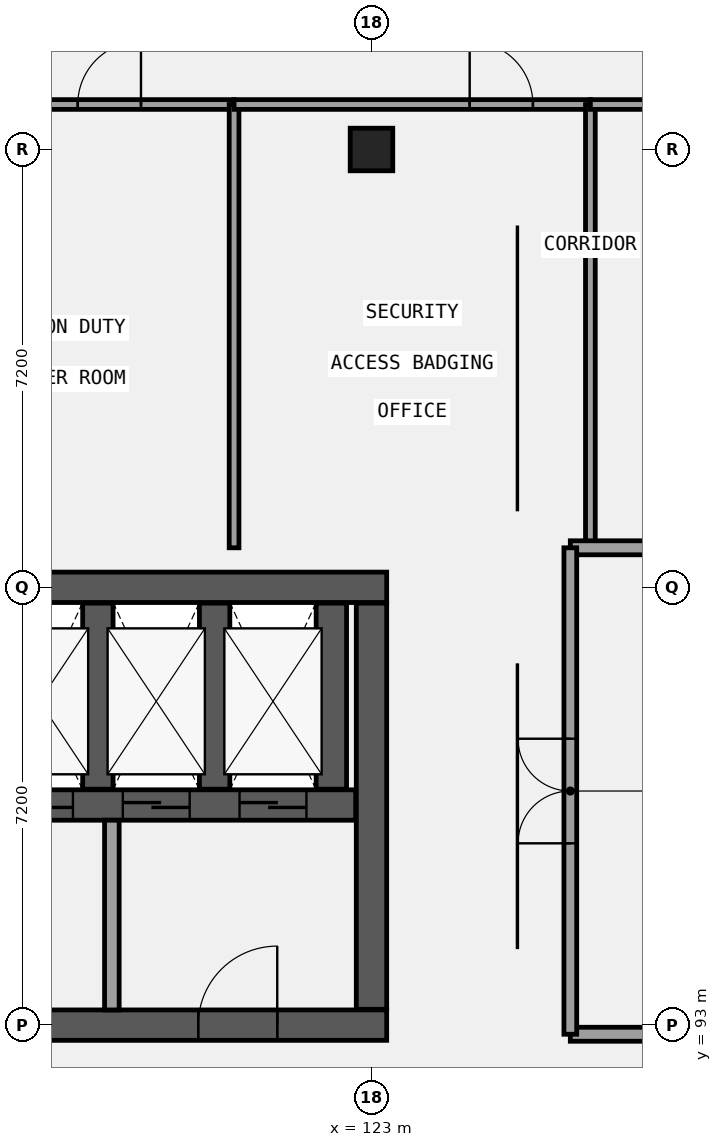
"""IFC4 building model, lengths in metres.
Left out: names, types, materials, properties, quantities, classifications, styles, units other than length and angle.
Written with IfcOpenShell. Run it as: python <this file> out.ifc"""

import sys

from ifc_helpers import new_model, si_unit, direction, frame, frame_2d, origin, origin_2d, place, context, subcontext, project, spatial, rectangle, extrude, element, fill, save


model = new_model("IFC4")
c1 = context("Model", 3, precision=1e-05, world=origin(), true_north=direction((0.0, 1.0)))
c2 = subcontext(c1, "Body", "Model", "MODEL_VIEW")
j1 = project(units=[si_unit("LENGTHUNIT", "METRE"), si_unit("PLANEANGLEUNIT", "RADIAN")], contexts=[c1])
p1 = place(None, origin())
s1 = spatial("IfcSite", under=j1, at=p1, CompositionType="ELEMENT")
p2 = place(p1, origin())
s2 = spatial("IfcBuilding", under=s1, at=p2, CompositionType="ELEMENT")
p3 = place(p2, origin())
s3 = spatial("IfcBuildingStorey", under=s2, at=p3, CompositionType="ELEMENT", Elevation=0.0)
p4 = place(p3, frame((108.35, 100.2, 0.0), z_axis=(0.0, 0.0, 1.0), x_axis=(1.0, 0.0, 0.0)))
e1 = element("IfcWall", 1, at=p4, inside=s3, PredefinedType="SHEAR", context=c2, shape_type="SweptSolid", body=[
    extrude(rectangle(XDim=14.9, YDim=0.5, at=frame_2d((7.45, 0.0))), origin(), (0.0, 0.0, 1.0), 5.4),
])
p5 = place(p3, frame((108.35, 93.0, 0.0), z_axis=(0.0, 0.0, 1.0), x_axis=(1.0, 0.0, 0.0)))
e2 = element("IfcWall", 2, at=p5, inside=s3, PredefinedType="SHEAR", context=c2, shape_type="SweptSolid", body=[
    extrude(rectangle(XDim=14.9, YDim=0.5, at=frame_2d((7.45, 0.0))), origin(), (0.0, 0.0, 1.0), 5.4),
])
p6 = place(p5, frame((3.8, 0.0, 0.0)))
e3 = element("IfcOpeningElement", 3, at=p6, cuts=e2, PredefinedType="OPENING", context=c2, shape_type="SweptSolid", body=[
    extrude(rectangle(XDim=1.3, YDim=2.2, at=frame_2d((0.65, 1.1))), frame((0.0, 0.26, 0.0), z_axis=(0.0, -1.0, 0.0), x_axis=(1.0, 0.0, 0.0)), (0.0, 0.0, 1.0), 0.52),
])
p7 = place(p5, frame((11.8, 0.0, 0.0)))
e4 = element("IfcOpeningElement", 4, at=p7, cuts=e2, PredefinedType="OPENING", context=c2, shape_type="SweptSolid", body=[
    extrude(rectangle(XDim=1.3, YDim=2.2, at=frame_2d((0.65, 1.1))), frame((0.0, 0.26, 0.0), z_axis=(0.0, -1.0, 0.0), x_axis=(1.0, 0.0, 0.0)), (0.0, 0.0, 1.0), 0.52),
])
p8 = place(p3, frame((123.0, 93.26, 0.0), z_axis=(0.0, 0.0, 1.0), x_axis=(0.0, 1.0, 0.0)))
e5 = element("IfcWall", 5, at=p8, inside=s3, PredefinedType="SHEAR", context=c2, shape_type="SweptSolid", body=[
    extrude(rectangle(XDim=6.68, YDim=0.5, at=frame_2d((3.34, 0.0))), origin(), (0.0, 0.0, 1.0), 5.4),
])
p9 = place(p3, frame((108.86, 96.62, 0.0), z_axis=(0.0, 0.0, 1.0), x_axis=(1.0, 0.0, 0.0)))
e6 = element("IfcWall", 6, at=p9, inside=s3, PredefinedType="SHEAR", context=c2, shape_type="SweptSolid", body=[
    extrude(rectangle(XDim=13.88, YDim=0.5, at=frame_2d((6.94, 0.0))), origin(), (0.0, 0.0, 1.0), 5.4),
])
p10 = place(p9, frame((8.13, 0.0, 0.0)))
e7 = element("IfcOpeningElement", 7, at=p10, cuts=e6, PredefinedType="OPENING", context=c2, shape_type="SweptSolid", body=[
    extrude(rectangle(XDim=1.1, YDim=2.15, at=frame_2d((0.55, 1.075))), frame((0.0, 0.26, 0.0), z_axis=(0.0, -1.0, 0.0), x_axis=(1.0, 0.0, 0.0)), (0.0, 0.0, 1.0), 0.52),
])
p11 = place(p9, frame((10.05, 0.0, 0.0)))
e8 = element("IfcOpeningElement", 8, at=p11, cuts=e6, PredefinedType="OPENING", context=c2, shape_type="SweptSolid", body=[
    extrude(rectangle(XDim=1.1, YDim=2.15, at=frame_2d((0.55, 1.075))), frame((0.0, 0.26, 0.0), z_axis=(0.0, -1.0, 0.0), x_axis=(1.0, 0.0, 0.0)), (0.0, 0.0, 1.0), 0.52),
])
p12 = place(p9, frame((11.97, 0.0, 0.0)))
e9 = element("IfcOpeningElement", 9, at=p12, cuts=e6, PredefinedType="OPENING", context=c2, shape_type="SweptSolid", body=[
    extrude(rectangle(XDim=1.1, YDim=2.15, at=frame_2d((0.55, 1.075))), frame((0.0, 0.26, 0.0), z_axis=(0.0, -1.0, 0.0), x_axis=(1.0, 0.0, 0.0)), (0.0, 0.0, 1.0), 0.52),
])
p13 = place(p9, frame((0.315, 0.0, 0.0)))
e10 = element("IfcOpeningElement", 10, at=p13, cuts=e6, PredefinedType="OPENING", context=c2, shape_type="SweptSolid", body=[
    extrude(rectangle(XDim=1.15, YDim=2.15, at=frame_2d((0.575, 1.075))), frame((0.0, 0.26, 0.0), z_axis=(0.0, -1.0, 0.0), x_axis=(1.0, 0.0, 0.0)), (0.0, 0.0, 1.0), 0.52),
])
for number, where, z_axis, x_axis in (
    (11, (118.5, 96.88, 0.0), (0.0, 0.0, 1.0), (0.0, 1.0, 0.0)),
    (12, (120.42, 96.88, 0.0), (0.0, 0.0, 1.0), (0.0, 1.0, 0.0)),
    (13, (122.34, 96.88, 0.0), (0.0, 0.0, 1.0), (0.0, 1.0, 0.0)),
):
    element("IfcWall", number, at=place(p3, frame(where, z_axis=z_axis, x_axis=x_axis)), inside=s3, PredefinedType="SHEAR", context=c2, shape_type="SweptSolid", body=[
        extrude(rectangle(XDim=3.06, YDim=0.5, at=frame_2d((1.53, 0.0))), origin(), (0.0, 0.0, 1.0), 5.4),
    ])
p14 = place(p3, frame((123.0, 107.4, 0.0), z_axis=(0.0, 0.0, 1.0), x_axis=(1.0, 0.0, 0.0)))
e14 = element("IfcColumn", 14, at=p14, inside=s3, PredefinedType="COLUMN", context=c2, shape_type="SweptSolid", body=[
    extrude(rectangle(XDim=0.7, YDim=0.7, at=origin_2d()), origin(), (0.0, 0.0, 1.0), 5.4),
])
p15 = place(p3, frame((118.73, 93.25, 0.0), z_axis=(0.0, 0.0, 1.0), x_axis=(0.0, 1.0, 0.0)))
e15 = element("IfcWall", 15, at=p15, inside=s3, PredefinedType="SOLIDWALL", context=c2, shape_type="SweptSolid", body=[
    extrude(rectangle(XDim=3.12, YDim=0.24, at=frame_2d((1.56, 0.0))), origin(), (0.0, 0.0, 1.0), 5.09),
])
p16 = place(p3, frame((114.88, 108.14, 0.0), z_axis=(0.0, 0.0, 1.0), x_axis=(1.0, 0.0, 0.0)))
e16 = element("IfcWall", 16, at=p16, inside=s3, PredefinedType="PARTITIONING", context=c2, shape_type="SweptSolid", body=[
    extrude(rectangle(XDim=5.86, YDim=0.16, at=frame_2d((2.93, 0.0))), origin(), (0.0, 0.0, 1.0), 5.12),
])
p17 = place(p16, frame((3.289, 0.0, 0.0)))
e17 = element("IfcOpeningElement", 17, at=p17, cuts=e16, PredefinedType="OPENING", context=c2, shape_type="SweptSolid", body=[
    extrude(rectangle(XDim=1.04, YDim=2.1, at=frame_2d((0.52, 1.05))), frame((0.0, 0.09, 0.0), z_axis=(0.0, -1.0, 0.0), x_axis=(1.0, 0.0, 0.0)), (0.0, 0.0, 1.0), 0.18),
])
p18 = place(p3, frame((120.74, 100.85, 0.0), z_axis=(0.0, 0.0, 1.0), x_axis=(0.0, 1.0, 0.0)))
e18 = element("IfcWall", 18, at=p18, inside=s3, PredefinedType="PARTITIONING", context=c2, shape_type="SweptSolid", body=[
    extrude(rectangle(XDim=7.29, YDim=0.16, at=frame_2d((3.645, 0.0))), origin(), (0.0, 0.0, 1.0), 5.12),
])
p19 = place(p3, frame((120.74, 108.14, 0.0), z_axis=(0.0, 0.0, 1.0), x_axis=(1.0, 0.0, 0.0)))
e19 = element("IfcWall", 19, at=p19, inside=s3, PredefinedType="PARTITIONING", context=c2, shape_type="SweptSolid", body=[
    extrude(rectangle(XDim=5.86, YDim=0.16, at=frame_2d((2.93, 0.0))), origin(), (0.0, 0.0, 1.0), 5.12),
])
p20 = place(p19, frame((3.875, 0.0, 0.0)))
e20 = element("IfcOpeningElement", 20, at=p20, cuts=e19, PredefinedType="OPENING", context=c2, shape_type="SweptSolid", body=[
    extrude(rectangle(XDim=1.04, YDim=2.22, at=frame_2d((0.52, 1.11))), frame((0.0, 0.09, 0.0), z_axis=(0.0, -1.0, 0.0), x_axis=(1.0, 0.0, 0.0)), (0.0, 0.0, 1.0), 0.18),
])
p21 = place(p3, frame((126.6, 100.85, 0.0), z_axis=(0.0, 0.0, 1.0), x_axis=(0.0, 1.0, 0.0)))
e21 = element("IfcWall", 21, at=p21, inside=s3, PredefinedType="PARTITIONING", context=c2, shape_type="SweptSolid", body=[
    extrude(rectangle(XDim=7.29, YDim=0.16, at=frame_2d((3.645, 0.0))), origin(), (0.0, 0.0, 1.0), 5.12),
])
p22 = place(p3, frame((126.6, 108.14, 0.0), z_axis=(0.0, 0.0, 1.0), x_axis=(1.0, 0.0, 0.0)))
e22 = element("IfcWall", 22, at=p22, inside=s3, PredefinedType="PARTITIONING", context=c2, shape_type="SweptSolid", body=[
    extrude(rectangle(XDim=5.86, YDim=0.16, at=frame_2d((2.93, 0.0))), origin(), (0.0, 0.0, 1.0), 5.12),
])
p23 = place(p22, frame((0.945, 0.0, 0.0)))
e23 = element("IfcOpeningElement", 23, at=p23, cuts=e22, PredefinedType="OPENING", context=c2, shape_type="SweptSolid", body=[
    extrude(rectangle(XDim=1.04, YDim=2.35, at=frame_2d((0.52, 1.175))), frame((0.0, 0.09, 0.0), z_axis=(0.0, -1.0, 0.0), x_axis=(1.0, 0.0, 0.0)), (0.0, 0.0, 1.0), 0.18),
])
p24 = place(p3, frame((126.27, 92.85, 0.0), z_axis=(0.0, 0.0, 1.0), x_axis=(1.0, 0.0, 0.0)))
e24 = element("IfcWall", 24, at=p24, inside=s3, PredefinedType="PARTITIONING", context=c2, shape_type="SweptSolid", body=[
    extrude(rectangle(XDim=3.28, YDim=0.23, at=frame_2d((1.64, 0.0))), origin(), (0.0, 0.0, 1.0), 4.32),
])
p25 = place(p3, frame((126.27, 100.85, 0.0), z_axis=(0.0, 0.0, 1.0), x_axis=(1.0, 0.0, 0.0)))
e25 = element("IfcWall", 25, at=p25, inside=s3, PredefinedType="PARTITIONING", context=c2, shape_type="SweptSolid", body=[
    extrude(rectangle(XDim=3.28, YDim=0.23, at=frame_2d((1.64, 0.0))), origin(), (0.0, 0.0, 1.0), 5.12),
])
p26 = place(p3, frame((126.27, 92.85, 0.0), z_axis=(0.0, 0.0, 1.0), x_axis=(0.0, 1.0, 0.0)))
e26 = element("IfcWall", 26, at=p26, inside=s3, PredefinedType="PARTITIONING", context=c2, shape_type="SweptSolid", body=[
    extrude(rectangle(XDim=8.0, YDim=0.21, at=frame_2d((4.0, 0.0))), origin(), (0.0, 0.0, 1.0), 5.12),
])
p27 = place(p26, frame((3.14, 0.0, 0.0)))
e27 = element("IfcOpeningElement", 27, at=p27, cuts=e26, PredefinedType="OPENING", context=c2, shape_type="SweptSolid", body=[
    extrude(rectangle(XDim=1.72, YDim=2.22, at=frame_2d((0.86, 1.11))), frame((0.0, 0.115, 0.0), z_axis=(0.0, -1.0, 0.0), x_axis=(1.0, 0.0, 0.0)), (0.0, 0.0, 1.0), 0.23),
])
p28 = place(p10, frame((1.1, 0.0, 0.0), z_axis=(0.0, 0.0, 1.0), x_axis=(-1.0, 0.0, 0.0)))
e28 = element("IfcDoor", 28, at=p28, inside=s3, OperationType="DOUBLE_DOOR_SLIDING", PredefinedType="DOOR", context=c2, shape_type="SweptSolid", body=[
    extrude(rectangle(XDim=1.1, YDim=2.15, at=frame_2d((0.55, 1.075))), frame((0.0, 0.025, 0.0), z_axis=(0.0, -1.0, 0.0), x_axis=(1.0, 0.0, 0.0)), (0.0, 0.0, 1.0), 0.05),
])
fill(e7, e28)
p29 = place(p11, frame((1.1, 0.0, 0.0), z_axis=(0.0, 0.0, 1.0), x_axis=(-1.0, 0.0, 0.0)))
e29 = element("IfcDoor", 29, at=p29, inside=s3, OperationType="DOUBLE_DOOR_SLIDING", PredefinedType="DOOR", context=c2, shape_type="SweptSolid", body=[
    extrude(rectangle(XDim=1.1, YDim=2.15, at=frame_2d((0.55, 1.075))), frame((0.0, 0.025, 0.0), z_axis=(0.0, -1.0, 0.0), x_axis=(1.0, 0.0, 0.0)), (0.0, 0.0, 1.0), 0.05),
])
fill(e8, e29)
p30 = place(p12, frame((1.1, 0.0, 0.0), z_axis=(0.0, 0.0, 1.0), x_axis=(-1.0, 0.0, 0.0)))
e30 = element("IfcDoor", 30, at=p30, inside=s3, OperationType="DOUBLE_DOOR_SLIDING", PredefinedType="DOOR", context=c2, shape_type="SweptSolid", body=[
    extrude(rectangle(XDim=1.1, YDim=2.15, at=frame_2d((0.55, 1.075))), frame((0.0, 0.025, 0.0), z_axis=(0.0, -1.0, 0.0), x_axis=(1.0, 0.0, 0.0)), (0.0, 0.0, 1.0), 0.05),
])
fill(e9, e30)
p31 = place(p7, frame((1.3, 0.0, 0.0), z_axis=(0.0, 0.0, 1.0), x_axis=(-1.0, 0.0, 0.0)))
e31 = element("IfcDoor", 31, at=p31, inside=s3, OperationType="SINGLE_SWING_RIGHT", PredefinedType="DOOR", context=c2, shape_type="SweptSolid", body=[
    extrude(rectangle(XDim=1.3, YDim=2.2, at=frame_2d((0.65, 1.1))), frame((0.0, 0.025, 0.0), z_axis=(0.0, -1.0, 0.0), x_axis=(1.0, 0.0, 0.0)), (0.0, 0.0, 1.0), 0.05),
])
fill(e4, e31)
p32 = place(p17, frame((1.04, 0.0, 0.0), z_axis=(0.0, 0.0, 1.0), x_axis=(-1.0, 0.0, 0.0)))
e32 = element("IfcDoor", 32, at=p32, inside=s3, OperationType="SINGLE_SWING_RIGHT", PredefinedType="DOOR", context=c2, shape_type="SweptSolid", body=[
    extrude(rectangle(XDim=1.04, YDim=2.1, at=frame_2d((0.52, 1.05))), frame((0.0, 0.025, 0.0), z_axis=(0.0, -1.0, 0.0), x_axis=(1.0, 0.0, 0.0)), (0.0, 0.0, 1.0), 0.05),
])
fill(e17, e32)
p33 = place(p20, frame((1.04, 0.0, 0.0), z_axis=(0.0, 0.0, 1.0), x_axis=(-1.0, 0.0, 0.0)))
e33 = element("IfcDoor", 33, at=p33, inside=s3, OperationType="SINGLE_SWING_LEFT", PredefinedType="DOOR", context=c2, shape_type="SweptSolid", body=[
    extrude(rectangle(XDim=1.04, YDim=2.22, at=frame_2d((0.52, 1.11))), frame((0.0, 0.025, 0.0), z_axis=(0.0, -1.0, 0.0), x_axis=(1.0, 0.0, 0.0)), (0.0, 0.0, 1.0), 0.05),
])
fill(e20, e33)
p34 = place(p27, origin())
e34 = element("IfcDoor", 34, at=p34, inside=s3, OperationType="DOUBLE_DOOR_SINGLE_SWING", PredefinedType="DOOR", context=c2, shape_type="SweptSolid", body=[
    extrude(rectangle(XDim=1.72, YDim=2.22, at=frame_2d((0.86, 1.11))), frame((0.0, 0.025, 0.0), z_axis=(0.0, -1.0, 0.0), x_axis=(1.0, 0.0, 0.0)), (0.0, 0.0, 1.0), 0.05),
])
fill(e27, e34)
save(model, sys.argv[1])
